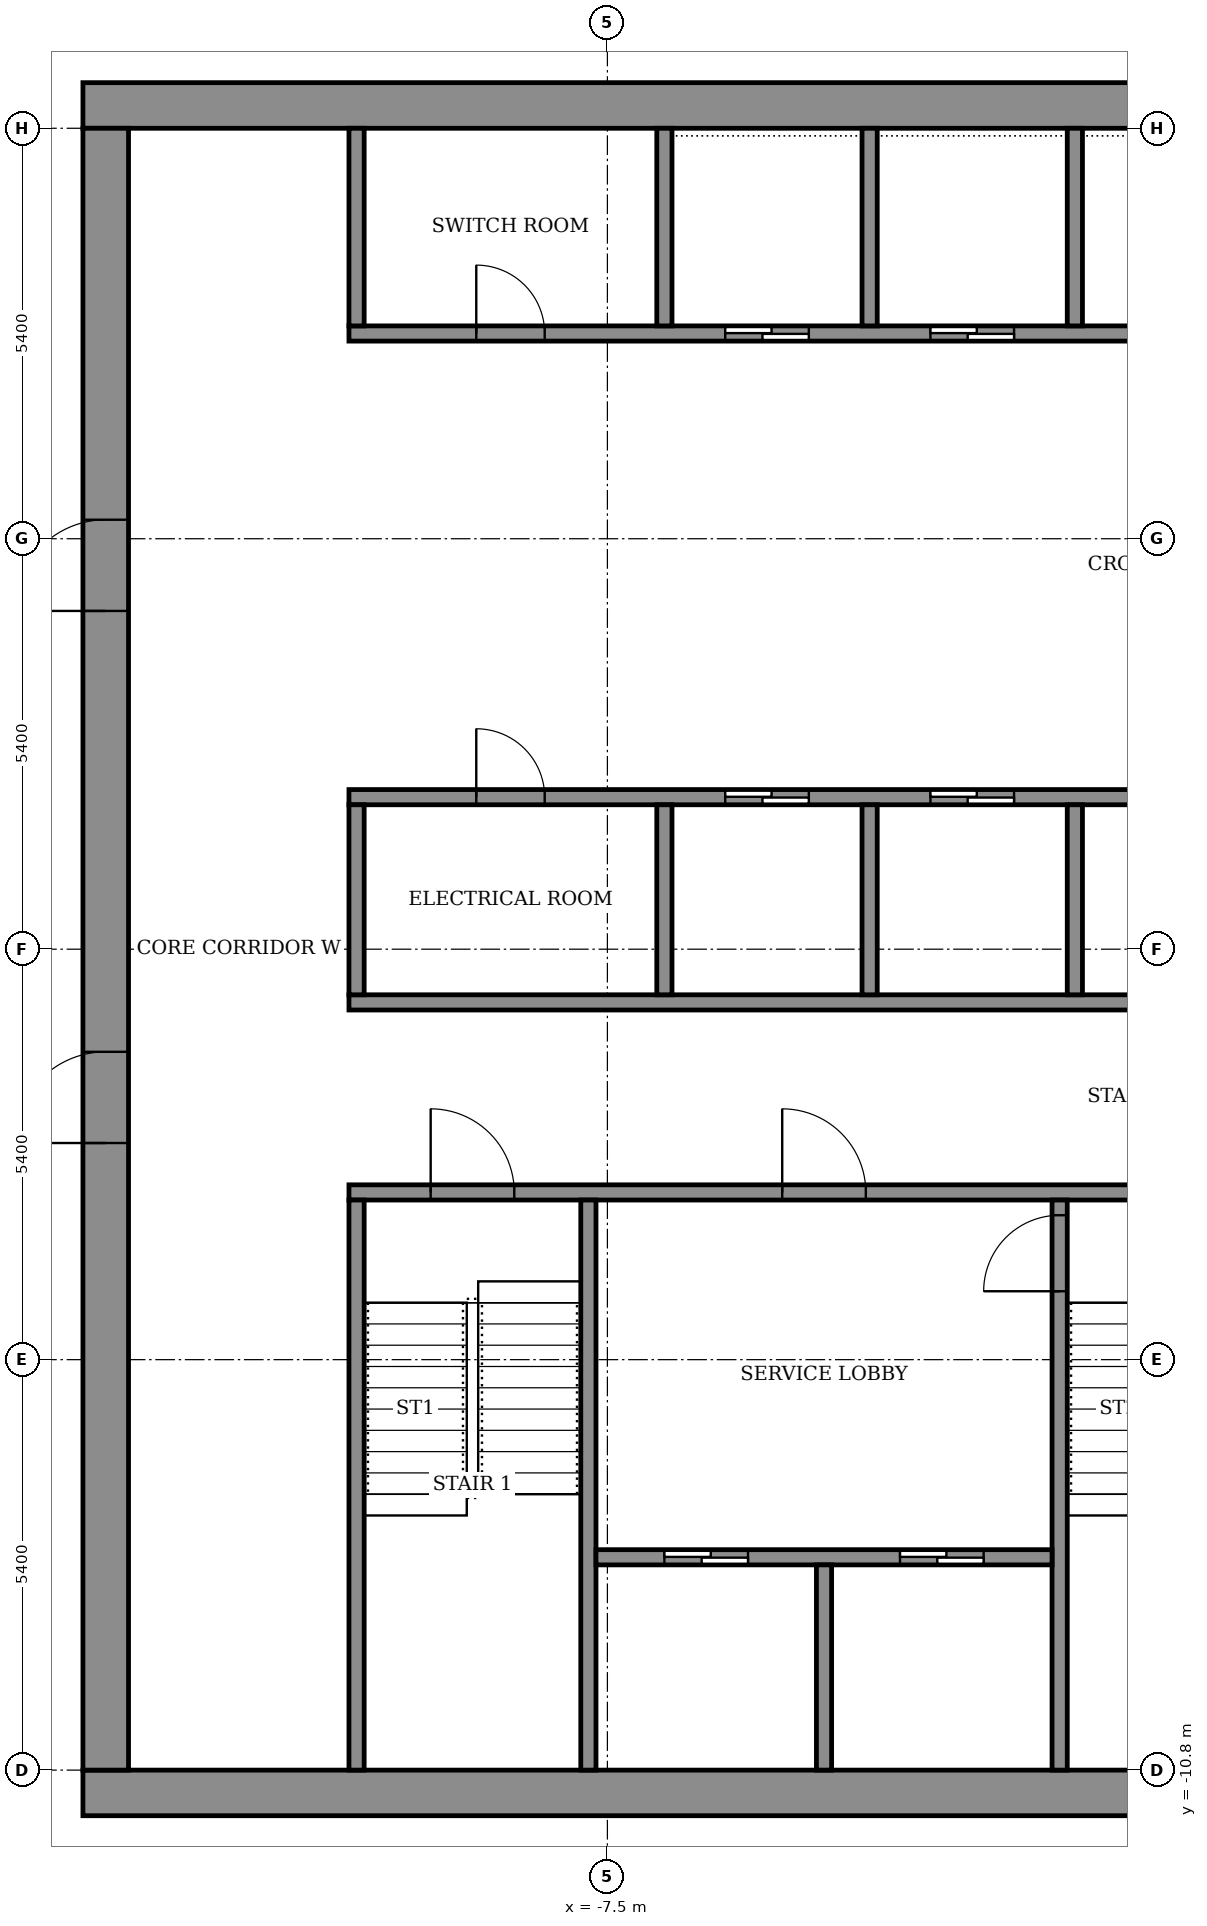
"""IFC4 building model, lengths in metres.
Left out: names, types, materials, properties, quantities, classifications, styles, units other than length and angle.
Written with IfcOpenShell. Run it as: python <this file> out.ifc"""

import sys

from ifc_helpers import new_model, si_unit, direction, frame, frame_2d, origin, place, context, subcontext, project, spatial, rectangle, extrude, element, fill, save


model = new_model("IFC4")
c1 = context("Model", 3, precision=1e-05, world=origin(), true_north=direction((0.0, 1.0)))
c2 = subcontext(c1, "Body", "Model", "MODEL_VIEW")
j1 = project(units=[si_unit("LENGTHUNIT", "METRE"), si_unit("PLANEANGLEUNIT", "RADIAN")], contexts=[c1])
p1 = place(None, origin())
s1 = spatial("IfcSite", under=j1, at=p1, CompositionType="ELEMENT")
p2 = place(p1, origin())
s2 = spatial("IfcBuilding", under=s1, at=p2, CompositionType="ELEMENT")
p3 = place(p2, frame((0.0, 0.0, 342.5)))
s3 = spatial("IfcBuildingStorey", under=s2, at=p3, CompositionType="ELEMENT", Elevation=342.5)
for number, where, z_axis, x_axis in (
    (1, (-14.4, -11.1, 0.0), (0.0, 0.0, 1.0), (1.0, 0.0, 0.0)),
    (2, (-14.4, 11.1, 0.0), (0.0, 0.0, 1.0), (1.0, 0.0, 0.0)),
):
    element("IfcWall", number, at=place(p3, frame(where, z_axis=z_axis, x_axis=x_axis)), inside=s3, PredefinedType="SHEAR", context=c2, shape_type="SweptSolid", body=[
        extrude(rectangle(XDim=28.8, YDim=0.6, at=frame_2d((14.4, 0.0))), origin(), (0.0, 0.0, 1.0), 3.6),
    ])
p4 = place(p3, frame((-14.1, -10.8, 0.0), z_axis=(0.0, 0.0, 1.0), x_axis=(0.0, 1.0, 0.0)))
e3 = element("IfcWall", 3, at=p4, inside=s3, PredefinedType="SHEAR", context=c2, shape_type="SweptSolid", body=[
    extrude(rectangle(XDim=21.6, YDim=0.6, at=frame_2d((10.8, 0.0))), origin(), (0.0, 0.0, 1.0), 3.6),
])
p5 = place(p4, frame((8.25, 0.0, 0.0)))
e4 = element("IfcOpeningElement", 4, at=p5, cuts=e3, PredefinedType="OPENING", context=c2, shape_type="SweptSolid", body=[
    extrude(rectangle(XDim=1.2, YDim=2.1, at=frame_2d((0.6, 1.05))), frame((0.0, 0.31, 0.0), z_axis=(0.0, -1.0, 0.0), x_axis=(1.0, 0.0, 0.0)), (0.0, 0.0, 1.0), 0.62),
])
p6 = place(p4, frame((15.25, 0.0, 0.0)))
e5 = element("IfcOpeningElement", 5, at=p6, cuts=e3, PredefinedType="OPENING", context=c2, shape_type="SweptSolid", body=[
    extrude(rectangle(XDim=1.2, YDim=2.1, at=frame_2d((0.6, 1.05))), frame((0.0, 0.31, 0.0), z_axis=(0.0, -1.0, 0.0), x_axis=(1.0, 0.0, 0.0)), (0.0, 0.0, 1.0), 0.62),
])
p7 = place(p3, frame((-10.9, -3.2, 0.0), z_axis=(0.0, 0.0, 1.0), x_axis=(1.0, 0.0, 0.0)))
e6 = element("IfcWall", 6, at=p7, inside=s3, PredefinedType="SHEAR", context=c2, shape_type="SweptSolid", body=[
    extrude(rectangle(XDim=21.8, YDim=0.2, at=frame_2d((10.9, 0.0))), origin(), (0.0, 0.0, 1.0), 3.05),
])
p8 = place(p7, frame((1.075, 0.0, 0.0)))
e7 = element("IfcOpeningElement", 7, at=p8, cuts=e6, PredefinedType="OPENING", context=c2, shape_type="SweptSolid", body=[
    extrude(rectangle(XDim=1.1, YDim=2.1, at=frame_2d((0.55, 1.05))), frame((0.0, 0.11, 0.0), z_axis=(0.0, -1.0, 0.0), x_axis=(1.0, 0.0, 0.0)), (0.0, 0.0, 1.0), 0.22),
])
p9 = place(p7, frame((10.325, 0.0, 0.0)))
e8 = element("IfcOpeningElement", 8, at=p9, cuts=e6, PredefinedType="OPENING", context=c2, shape_type="SweptSolid", body=[
    extrude(rectangle(XDim=1.1, YDim=2.1, at=frame_2d((0.55, 1.05))), frame((0.0, 0.11, 0.0), z_axis=(0.0, -1.0, 0.0), x_axis=(1.0, 0.0, 0.0)), (0.0, 0.0, 1.0), 0.22),
])
p10 = place(p7, frame((19.625, 0.0, 0.0)))
e9 = element("IfcOpeningElement", 9, at=p10, cuts=e6, PredefinedType="OPENING", context=c2, shape_type="SweptSolid", body=[
    extrude(rectangle(XDim=1.1, YDim=2.1, at=frame_2d((0.55, 1.05))), frame((0.0, 0.11, 0.0), z_axis=(0.0, -1.0, 0.0), x_axis=(1.0, 0.0, 0.0)), (0.0, 0.0, 1.0), 0.22),
])
p11 = place(p7, frame((5.7, 0.0, 0.0)))
e10 = element("IfcOpeningElement", 10, at=p11, cuts=e6, PredefinedType="OPENING", context=c2, shape_type="SweptSolid", body=[
    extrude(rectangle(XDim=1.1, YDim=2.1, at=frame_2d((0.55, 1.05))), frame((0.0, 0.11, 0.0), z_axis=(0.0, -1.0, 0.0), x_axis=(1.0, 0.0, 0.0)), (0.0, 0.0, 1.0), 0.22),
])
p12 = place(p7, frame((14.975, 0.0, 0.0)))
e11 = element("IfcOpeningElement", 11, at=p12, cuts=e6, PredefinedType="OPENING", context=c2, shape_type="SweptSolid", body=[
    extrude(rectangle(XDim=1.1, YDim=2.1, at=frame_2d((0.55, 1.05))), frame((0.0, 0.11, 0.0), z_axis=(0.0, -1.0, 0.0), x_axis=(1.0, 0.0, 0.0)), (0.0, 0.0, 1.0), 0.22),
])
p13 = place(p3, frame((-10.9, -0.7, 0.0), z_axis=(0.0, 0.0, 1.0), x_axis=(1.0, 0.0, 0.0)))
e12 = element("IfcWall", 12, at=p13, inside=s3, PredefinedType="SHEAR", context=c2, shape_type="SweptSolid", body=[
    extrude(rectangle(XDim=21.8, YDim=0.2, at=frame_2d((10.9, 0.0))), origin(), (0.0, 0.0, 1.0), 3.05),
])
p14 = place(p3, frame((-10.9, 2.0, 0.0), z_axis=(0.0, 0.0, 1.0), x_axis=(1.0, 0.0, 0.0)))
e13 = element("IfcWall", 13, at=p14, inside=s3, PredefinedType="SHEAR", context=c2, shape_type="SweptSolid", body=[
    extrude(rectangle(XDim=21.8, YDim=0.2, at=frame_2d((10.9, 0.0))), origin(), (0.0, 0.0, 1.0), 3.05),
])
p15 = place(p14, frame((4.95, 0.0, 0.0)))
e14 = element("IfcOpeningElement", 14, at=p15, cuts=e13, PredefinedType="OPENING", context=c2, shape_type="SweptSolid", body=[
    extrude(rectangle(XDim=1.1, YDim=2.1, at=frame_2d((0.55, 1.05))), frame((0.0, 0.11, 0.0), z_axis=(0.0, -1.0, 0.0), x_axis=(1.0, 0.0, 0.0)), (0.0, 0.0, 1.0), 0.22),
])
p16 = place(p14, frame((7.65, 0.0, 0.0)))
e15 = element("IfcOpeningElement", 15, at=p16, cuts=e13, PredefinedType="OPENING", context=c2, shape_type="SweptSolid", body=[
    extrude(rectangle(XDim=1.1, YDim=2.1, at=frame_2d((0.55, 1.05))), frame((0.0, 0.11, 0.0), z_axis=(0.0, -1.0, 0.0), x_axis=(1.0, 0.0, 0.0)), (0.0, 0.0, 1.0), 0.22),
])
p17 = place(p14, frame((10.35, 0.0, 0.0)))
e16 = element("IfcOpeningElement", 16, at=p17, cuts=e13, PredefinedType="OPENING", context=c2, shape_type="SweptSolid", body=[
    extrude(rectangle(XDim=1.1, YDim=2.1, at=frame_2d((0.55, 1.05))), frame((0.0, 0.11, 0.0), z_axis=(0.0, -1.0, 0.0), x_axis=(1.0, 0.0, 0.0)), (0.0, 0.0, 1.0), 0.22),
])
p18 = place(p14, frame((1.675, 0.0, 0.0)))
e17 = element("IfcOpeningElement", 17, at=p18, cuts=e13, PredefinedType="OPENING", context=c2, shape_type="SweptSolid", body=[
    extrude(rectangle(XDim=0.9, YDim=2.1, at=frame_2d((0.45, 1.05))), frame((0.0, 0.11, 0.0), z_axis=(0.0, -1.0, 0.0), x_axis=(1.0, 0.0, 0.0)), (0.0, 0.0, 1.0), 0.22),
])
p19 = place(p14, frame((16.525, 0.0, 0.0)))
e18 = element("IfcOpeningElement", 18, at=p19, cuts=e13, PredefinedType="OPENING", context=c2, shape_type="SweptSolid", body=[
    extrude(rectangle(XDim=0.9, YDim=2.1, at=frame_2d((0.45, 1.05))), frame((0.0, 0.11, 0.0), z_axis=(0.0, -1.0, 0.0), x_axis=(1.0, 0.0, 0.0)), (0.0, 0.0, 1.0), 0.22),
])
p20 = place(p3, frame((-10.9, 8.1, 0.0), z_axis=(0.0, 0.0, 1.0), x_axis=(1.0, 0.0, 0.0)))
e19 = element("IfcWall", 19, at=p20, inside=s3, PredefinedType="SHEAR", context=c2, shape_type="SweptSolid", body=[
    extrude(rectangle(XDim=21.8, YDim=0.2, at=frame_2d((10.9, 0.0))), origin(), (0.0, 0.0, 1.0), 3.05),
])
p21 = place(p20, frame((4.95, 0.0, 0.0)))
e20 = element("IfcOpeningElement", 20, at=p21, cuts=e19, PredefinedType="OPENING", context=c2, shape_type="SweptSolid", body=[
    extrude(rectangle(XDim=1.1, YDim=2.1, at=frame_2d((0.55, 1.05))), frame((0.0, 0.11, 0.0), z_axis=(0.0, -1.0, 0.0), x_axis=(1.0, 0.0, 0.0)), (0.0, 0.0, 1.0), 0.22),
])
p22 = place(p20, frame((7.65, 0.0, 0.0)))
e21 = element("IfcOpeningElement", 21, at=p22, cuts=e19, PredefinedType="OPENING", context=c2, shape_type="SweptSolid", body=[
    extrude(rectangle(XDim=1.1, YDim=2.1, at=frame_2d((0.55, 1.05))), frame((0.0, 0.11, 0.0), z_axis=(0.0, -1.0, 0.0), x_axis=(1.0, 0.0, 0.0)), (0.0, 0.0, 1.0), 0.22),
])
p23 = place(p20, frame((10.35, 0.0, 0.0)))
e22 = element("IfcOpeningElement", 22, at=p23, cuts=e19, PredefinedType="OPENING", context=c2, shape_type="SweptSolid", body=[
    extrude(rectangle(XDim=1.1, YDim=2.1, at=frame_2d((0.55, 1.05))), frame((0.0, 0.11, 0.0), z_axis=(0.0, -1.0, 0.0), x_axis=(1.0, 0.0, 0.0)), (0.0, 0.0, 1.0), 0.22),
])
p24 = place(p20, frame((1.675, 0.0, 0.0)))
e23 = element("IfcOpeningElement", 23, at=p24, cuts=e19, PredefinedType="OPENING", context=c2, shape_type="SweptSolid", body=[
    extrude(rectangle(XDim=0.9, YDim=2.1, at=frame_2d((0.45, 1.05))), frame((0.0, 0.11, 0.0), z_axis=(0.0, -1.0, 0.0), x_axis=(1.0, 0.0, 0.0)), (0.0, 0.0, 1.0), 0.22),
])
p25 = place(p20, frame((13.825, 0.0, 0.0)))
e24 = element("IfcOpeningElement", 24, at=p25, cuts=e19, PredefinedType="OPENING", context=c2, shape_type="SweptSolid", body=[
    extrude(rectangle(XDim=0.9, YDim=2.1, at=frame_2d((0.45, 1.05))), frame((0.0, 0.11, 0.0), z_axis=(0.0, -1.0, 0.0), x_axis=(1.0, 0.0, 0.0)), (0.0, 0.0, 1.0), 0.22),
])
p26 = place(p20, frame((18.55, 0.0, 0.0)))
e25 = element("IfcOpeningElement", 25, at=p26, cuts=e19, PredefinedType="OPENING", context=c2, shape_type="SweptSolid", body=[
    extrude(rectangle(XDim=0.9, YDim=2.1, at=frame_2d((0.45, 1.05))), frame((0.0, 0.11, 0.0), z_axis=(0.0, -1.0, 0.0), x_axis=(1.0, 0.0, 0.0)), (0.0, 0.0, 1.0), 0.22),
])
for number, where, z_axis, x_axis in (
    (26, (-10.8, -10.8, 0.0), (0.0, 0.0, 1.0), (0.0, 1.0, 0.0)),
    (27, (-7.75, -10.8, 0.0), (0.0, 0.0, 1.0), (0.0, 1.0, 0.0)),
):
    element("IfcWall", number, at=place(p3, frame(where, z_axis=z_axis, x_axis=x_axis)), inside=s3, PredefinedType="SHEAR", context=c2, shape_type="SweptSolid", body=[
        extrude(rectangle(XDim=7.5, YDim=0.2, at=frame_2d((3.75, 0.0))), origin(), (0.0, 0.0, 1.0), 3.05),
    ])
p27 = place(p3, frame((-1.55, -10.8, 0.0), z_axis=(0.0, 0.0, 1.0), x_axis=(0.0, 1.0, 0.0)))
e28 = element("IfcWall", 28, at=p27, inside=s3, PredefinedType="SHEAR", context=c2, shape_type="SweptSolid", body=[
    extrude(rectangle(XDim=7.5, YDim=0.2, at=frame_2d((3.75, 0.0))), origin(), (0.0, 0.0, 1.0), 3.05),
])
p28 = place(p27, frame((6.3, 0.0, 0.0)))
e29 = element("IfcOpeningElement", 29, at=p28, cuts=e28, PredefinedType="OPENING", context=c2, shape_type="SweptSolid", body=[
    extrude(rectangle(XDim=1.0, YDim=2.1, at=frame_2d((0.5, 1.05))), frame((0.0, 0.11, 0.0), z_axis=(0.0, -1.0, 0.0), x_axis=(1.0, 0.0, 0.0)), (0.0, 0.0, 1.0), 0.22),
])
p29 = place(p3, frame((-7.65, -8.0, 0.0), z_axis=(0.0, 0.0, 1.0), x_axis=(1.0, 0.0, 0.0)))
e30 = element("IfcWall", 30, at=p29, inside=s3, PredefinedType="SHEAR", context=c2, shape_type="SweptSolid", body=[
    extrude(rectangle(XDim=6.0, YDim=0.2, at=frame_2d((3.0, 0.0))), origin(), (0.0, 0.0, 1.0), 3.05),
])
p30 = place(p29, frame((0.9, 0.0, 0.0)))
e31 = element("IfcOpeningElement", 31, at=p30, cuts=e30, PredefinedType="OPENING", context=c2, shape_type="SweptSolid", body=[
    extrude(rectangle(XDim=1.1, YDim=2.1, at=frame_2d((0.55, 1.05))), frame((0.0, 0.11, 0.0), z_axis=(0.0, -1.0, 0.0), x_axis=(1.0, 0.0, 0.0)), (0.0, 0.0, 1.0), 0.22),
])
p31 = place(p29, frame((4.0, 0.0, 0.0)))
e32 = element("IfcOpeningElement", 32, at=p31, cuts=e30, PredefinedType="OPENING", context=c2, shape_type="SweptSolid", body=[
    extrude(rectangle(XDim=1.1, YDim=2.1, at=frame_2d((0.55, 1.05))), frame((0.0, 0.11, 0.0), z_axis=(0.0, -1.0, 0.0), x_axis=(1.0, 0.0, 0.0)), (0.0, 0.0, 1.0), 0.22),
])
p32 = place(p3, frame((-4.65, -10.8, 0.0), z_axis=(0.0, 0.0, 1.0), x_axis=(0.0, 1.0, 0.0)))
e33 = element("IfcWall", 33, at=p32, inside=s3, PredefinedType="SHEAR", context=c2, shape_type="SweptSolid", body=[
    extrude(rectangle(XDim=2.7, YDim=0.2, at=frame_2d((1.35, 0.0))), origin(), (0.0, 0.0, 1.0), 3.05),
])
p33 = place(p3, frame((-10.8, -0.6, 0.0), z_axis=(0.0, 0.0, 1.0), x_axis=(0.0, 1.0, 0.0)))
e34 = element("IfcWall", 34, at=p33, inside=s3, PredefinedType="STANDARD", context=c2, shape_type="SweptSolid", body=[
    extrude(rectangle(XDim=2.5, YDim=0.2, at=frame_2d((1.25, 0.0))), origin(), (0.0, 0.0, 1.0), 3.05),
])
for number, where, z_axis, x_axis in (
    (35, (-6.75, -0.6, 0.0), (0.0, 0.0, 1.0), (0.0, 1.0, 0.0)),
    (36, (-4.05, -0.6, 0.0), (0.0, 0.0, 1.0), (0.0, 1.0, 0.0)),
    (37, (-1.35, -0.6, 0.0), (0.0, 0.0, 1.0), (0.0, 1.0, 0.0)),
):
    element("IfcWall", number, at=place(p3, frame(where, z_axis=z_axis, x_axis=x_axis)), inside=s3, PredefinedType="SHEAR", context=c2, shape_type="SweptSolid", body=[
        extrude(rectangle(XDim=2.5, YDim=0.2, at=frame_2d((1.25, 0.0))), origin(), (0.0, 0.0, 1.0), 3.05),
    ])
p34 = place(p3, frame((-10.8, 8.2, 0.0), z_axis=(0.0, 0.0, 1.0), x_axis=(0.0, 1.0, 0.0)))
e38 = element("IfcWall", 38, at=p34, inside=s3, PredefinedType="STANDARD", context=c2, shape_type="SweptSolid", body=[
    extrude(rectangle(XDim=2.6, YDim=0.2, at=frame_2d((1.3, 0.0))), origin(), (0.0, 0.0, 1.0), 3.05),
])
for number, where, z_axis, x_axis in (
    (39, (-6.75, 8.2, 0.0), (0.0, 0.0, 1.0), (0.0, 1.0, 0.0)),
    (40, (-4.05, 8.2, 0.0), (0.0, 0.0, 1.0), (0.0, 1.0, 0.0)),
    (41, (-1.35, 8.2, 0.0), (0.0, 0.0, 1.0), (0.0, 1.0, 0.0)),
):
    element("IfcWall", number, at=place(p3, frame(where, z_axis=z_axis, x_axis=x_axis)), inside=s3, PredefinedType="SHEAR", context=c2, shape_type="SweptSolid", body=[
        extrude(rectangle(XDim=2.6, YDim=0.2, at=frame_2d((1.3, 0.0))), origin(), (0.0, 0.0, 1.0), 3.05),
    ])
p35 = place(p5, origin())
e42 = element("IfcDoor", 42, at=p35, inside=s3, OperationType="DOUBLE_DOOR_SINGLE_SWING", PredefinedType="DOOR", context=c2, shape_type="SweptSolid", body=[
    extrude(rectangle(XDim=1.2, YDim=2.1, at=frame_2d((0.6, 1.05))), frame((0.0, 0.025, 0.0), z_axis=(0.0, -1.0, 0.0), x_axis=(1.0, 0.0, 0.0)), (0.0, 0.0, 1.0), 0.05),
])
fill(e4, e42)
p36 = place(p6, origin())
e43 = element("IfcDoor", 43, at=p36, inside=s3, OperationType="DOUBLE_DOOR_SINGLE_SWING", PredefinedType="DOOR", context=c2, shape_type="SweptSolid", body=[
    extrude(rectangle(XDim=1.2, YDim=2.1, at=frame_2d((0.6, 1.05))), frame((0.0, 0.025, 0.0), z_axis=(0.0, -1.0, 0.0), x_axis=(1.0, 0.0, 0.0)), (0.0, 0.0, 1.0), 0.05),
])
fill(e5, e43)
p37 = place(p15, origin())
e44 = element("IfcDoor", 44, at=p37, inside=s3, OperationType="SLIDING_TO_LEFT", PredefinedType="DOOR", context=c2, shape_type="SweptSolid", body=[
    extrude(rectangle(XDim=1.1, YDim=2.1, at=frame_2d((0.55, 1.05))), frame((0.0, 0.025, 0.0), z_axis=(0.0, -1.0, 0.0), x_axis=(1.0, 0.0, 0.0)), (0.0, 0.0, 1.0), 0.05),
])
fill(e14, e44)
p38 = place(p16, origin())
e45 = element("IfcDoor", 45, at=p38, inside=s3, OperationType="SLIDING_TO_LEFT", PredefinedType="DOOR", context=c2, shape_type="SweptSolid", body=[
    extrude(rectangle(XDim=1.1, YDim=2.1, at=frame_2d((0.55, 1.05))), frame((0.0, 0.025, 0.0), z_axis=(0.0, -1.0, 0.0), x_axis=(1.0, 0.0, 0.0)), (0.0, 0.0, 1.0), 0.05),
])
fill(e15, e45)
p39 = place(p21, origin())
e46 = element("IfcDoor", 46, at=p39, inside=s3, OperationType="SLIDING_TO_LEFT", PredefinedType="DOOR", context=c2, shape_type="SweptSolid", body=[
    extrude(rectangle(XDim=1.1, YDim=2.1, at=frame_2d((0.55, 1.05))), frame((0.0, 0.025, 0.0), z_axis=(0.0, -1.0, 0.0), x_axis=(1.0, 0.0, 0.0)), (0.0, 0.0, 1.0), 0.05),
])
fill(e20, e46)
p40 = place(p22, origin())
e47 = element("IfcDoor", 47, at=p40, inside=s3, OperationType="SLIDING_TO_LEFT", PredefinedType="DOOR", context=c2, shape_type="SweptSolid", body=[
    extrude(rectangle(XDim=1.1, YDim=2.1, at=frame_2d((0.55, 1.05))), frame((0.0, 0.025, 0.0), z_axis=(0.0, -1.0, 0.0), x_axis=(1.0, 0.0, 0.0)), (0.0, 0.0, 1.0), 0.05),
])
fill(e21, e47)
p41 = place(p18, origin())
e48 = element("IfcDoor", 48, at=p41, inside=s3, OperationType="SINGLE_SWING_LEFT", PredefinedType="DOOR", context=c2, shape_type="SweptSolid", body=[
    extrude(rectangle(XDim=0.9, YDim=2.1, at=frame_2d((0.45, 1.05))), frame((0.0, 0.025, 0.0), z_axis=(0.0, -1.0, 0.0), x_axis=(1.0, 0.0, 0.0)), (0.0, 0.0, 1.0), 0.05),
])
fill(e17, e48)
p42 = place(p24, origin())
e49 = element("IfcDoor", 49, at=p42, inside=s3, OperationType="SINGLE_SWING_LEFT", PredefinedType="DOOR", context=c2, shape_type="SweptSolid", body=[
    extrude(rectangle(XDim=0.9, YDim=2.1, at=frame_2d((0.45, 1.05))), frame((0.0, 0.025, 0.0), z_axis=(0.0, -1.0, 0.0), x_axis=(1.0, 0.0, 0.0)), (0.0, 0.0, 1.0), 0.05),
])
fill(e23, e49)
p43 = place(p30, origin())
e50 = element("IfcDoor", 50, at=p43, inside=s3, OperationType="SLIDING_TO_LEFT", PredefinedType="DOOR", context=c2, shape_type="SweptSolid", body=[
    extrude(rectangle(XDim=1.1, YDim=2.1, at=frame_2d((0.55, 1.05))), frame((0.0, 0.025, 0.0), z_axis=(0.0, -1.0, 0.0), x_axis=(1.0, 0.0, 0.0)), (0.0, 0.0, 1.0), 0.05),
])
fill(e31, e50)
p44 = place(p31, origin())
e51 = element("IfcDoor", 51, at=p44, inside=s3, OperationType="SLIDING_TO_LEFT", PredefinedType="DOOR", context=c2, shape_type="SweptSolid", body=[
    extrude(rectangle(XDim=1.1, YDim=2.1, at=frame_2d((0.55, 1.05))), frame((0.0, 0.025, 0.0), z_axis=(0.0, -1.0, 0.0), x_axis=(1.0, 0.0, 0.0)), (0.0, 0.0, 1.0), 0.05),
])
fill(e32, e51)
p45 = place(p8, origin())
e52 = element("IfcDoor", 52, at=p45, inside=s3, OperationType="SINGLE_SWING_RIGHT", PredefinedType="DOOR", context=c2, shape_type="SweptSolid", body=[
    extrude(rectangle(XDim=1.1, YDim=2.1, at=frame_2d((0.55, 1.05))), frame((0.0, 0.025, 0.0), z_axis=(0.0, -1.0, 0.0), x_axis=(1.0, 0.0, 0.0)), (0.0, 0.0, 1.0), 0.05),
])
fill(e7, e52)
p46 = place(p11, origin())
e53 = element("IfcDoor", 53, at=p46, inside=s3, OperationType="SINGLE_SWING_LEFT", PredefinedType="DOOR", context=c2, shape_type="SweptSolid", body=[
    extrude(rectangle(XDim=1.1, YDim=2.1, at=frame_2d((0.55, 1.05))), frame((0.0, 0.025, 0.0), z_axis=(0.0, -1.0, 0.0), x_axis=(1.0, 0.0, 0.0)), (0.0, 0.0, 1.0), 0.05),
])
fill(e10, e53)
p47 = place(p28, origin())
e54 = element("IfcDoor", 54, at=p47, inside=s3, OperationType="SINGLE_SWING_RIGHT", PredefinedType="DOOR", context=c2, shape_type="SweptSolid", body=[
    extrude(rectangle(XDim=1.0, YDim=2.1, at=frame_2d((0.5, 1.05))), frame((0.0, 0.025, 0.0), z_axis=(0.0, -1.0, 0.0), x_axis=(1.0, 0.0, 0.0)), (0.0, 0.0, 1.0), 0.05),
])
fill(e29, e54)
save(model, sys.argv[1])
